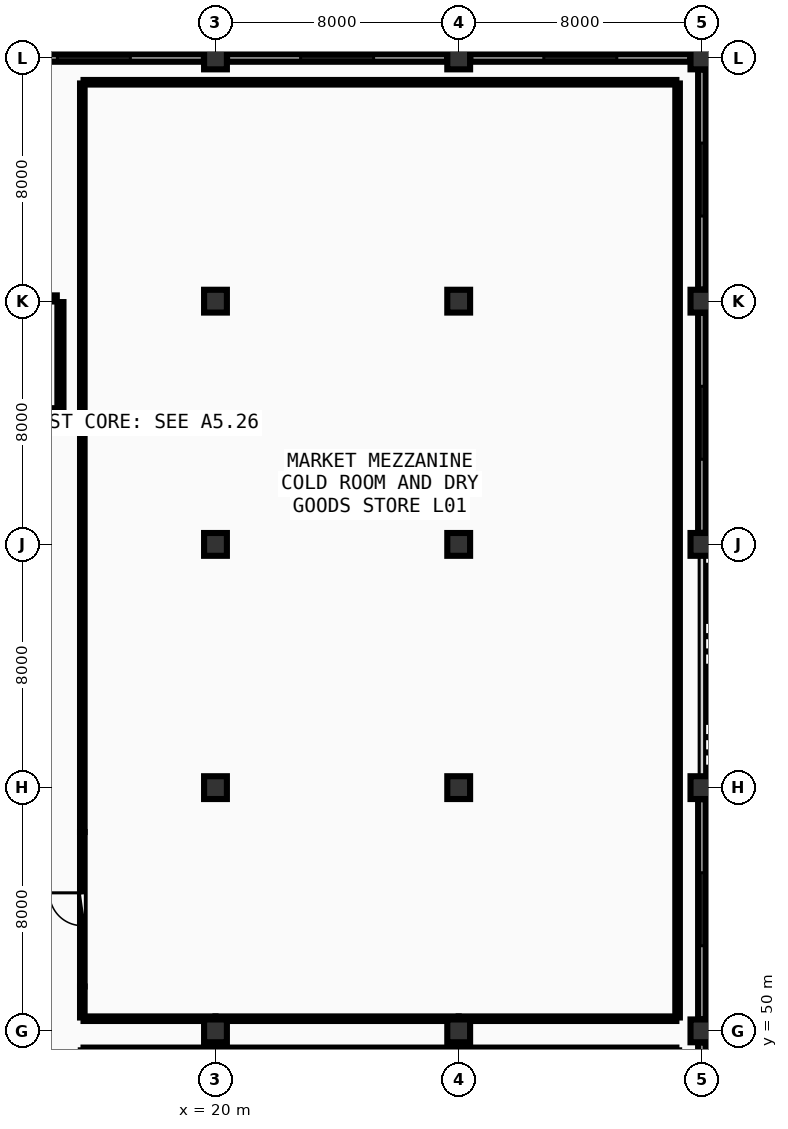
"""IFC4 building model, lengths in metres.
Left out: names, types, materials, properties, quantities, classifications, styles, units other than length and angle.
Written with IfcOpenShell. Run it as: python <this file> out.ifc"""

import sys

from ifc_helpers import new_model, si_unit, direction, frame, frame_2d, origin, origin_2d, place, context, subcontext, project, spatial, rectangle, extrude, element, fill, save


model = new_model("IFC4")
c1 = context("Model", 3, precision=1e-05, world=origin(), true_north=direction((0.0, 1.0)))
c2 = subcontext(c1, "Body", "Model", "MODEL_VIEW")
j1 = project(units=[si_unit("LENGTHUNIT", "METRE"), si_unit("PLANEANGLEUNIT", "RADIAN")], contexts=[c1])
p1 = place(None, origin())
s1 = spatial("IfcSite", under=j1, at=p1, CompositionType="ELEMENT")
p2 = place(p1, origin())
s2 = spatial("IfcBuilding", under=s1, at=p2, CompositionType="ELEMENT")
p3 = place(p2, frame((0.0, 0.0, 4.5)))
s3 = spatial("IfcBuildingStorey", under=s2, at=p3, CompositionType="ELEMENT", Elevation=4.5)
for number, where, z_axis, x_axis in (
    (1, (20.0, 50.0, 0.0), (0.0, 0.0, 1.0), (1.0, 0.0, 0.0)),
    (2, (20.0, 58.0, 0.0), (0.0, 0.0, 1.0), (1.0, 0.0, 0.0)),
    (3, (20.0, 66.0, 0.0), (0.0, 0.0, 1.0), (1.0, 0.0, 0.0)),
    (4, (20.0, 74.0, 0.0), (0.0, 0.0, 1.0), (1.0, 0.0, 0.0)),
    (5, (20.0, 82.0, 0.0), (0.0, 0.0, 1.0), (1.0, 0.0, 0.0)),
    (6, (28.0, 50.0, 0.0), (0.0, 0.0, 1.0), (1.0, 0.0, 0.0)),
    (7, (28.0, 58.0, 0.0), (0.0, 0.0, 1.0), (1.0, 0.0, 0.0)),
    (8, (28.0, 66.0, 0.0), (0.0, 0.0, 1.0), (1.0, 0.0, 0.0)),
    (9, (28.0, 74.0, 0.0), (0.0, 0.0, 1.0), (1.0, 0.0, 0.0)),
    (10, (28.0, 82.0, 0.0), (0.0, 0.0, 1.0), (1.0, 0.0, 0.0)),
    (11, (36.0, 50.0, 0.0), (0.0, 0.0, 1.0), (1.0, 0.0, 0.0)),
    (12, (36.0, 58.0, 0.0), (0.0, 0.0, 1.0), (1.0, 0.0, 0.0)),
    (13, (36.0, 66.0, 0.0), (0.0, 0.0, 1.0), (1.0, 0.0, 0.0)),
    (14, (36.0, 74.0, 0.0), (0.0, 0.0, 1.0), (1.0, 0.0, 0.0)),
    (15, (36.0, 82.0, 0.0), (0.0, 0.0, 1.0), (1.0, 0.0, 0.0)),
):
    element("IfcColumn", number, at=place(p3, frame(where, z_axis=z_axis, x_axis=x_axis)), inside=s3, PredefinedType="COLUMN", context=c2, shape_type="SweptSolid", body=[
        extrude(rectangle(XDim=0.75, YDim=0.75, at=origin_2d()), origin(), (0.0, 0.0, 1.0), 4.5),
    ])
p4 = place(p3, frame((36.0, 42.38, 0.0), z_axis=(0.0, 0.0, 1.0), x_axis=(0.0, 1.0, 0.0)))
e16 = element("IfcWall", 16, at=p4, inside=s3, PredefinedType="SOLIDWALL", context=c2, shape_type="SweptSolid", body=[
    extrude(rectangle(XDim=7.24, YDim=0.25, at=frame_2d((3.62, 0.0))), origin(), (0.0, 0.0, 1.0), 3.42),
])
p5 = place(p4, frame((2.42, 0.0, 0.95)))
e17 = element("IfcOpeningElement", 17, at=p5, cuts=e16, PredefinedType="OPENING", context=c2, shape_type="SweptSolid", body=[
    extrude(rectangle(XDim=2.4, YDim=1.65, at=frame_2d((1.2, 0.825))), frame((0.0, 0.135, 0.0), z_axis=(0.0, -1.0, 0.0), x_axis=(1.0, 0.0, 0.0)), (0.0, 0.0, 1.0), 0.27),
])
p6 = place(p3, frame((36.0, 50.38, 0.0), z_axis=(0.0, 0.0, 1.0), x_axis=(0.0, 1.0, 0.0)))
e18 = element("IfcWall", 18, at=p6, inside=s3, PredefinedType="SOLIDWALL", context=c2, shape_type="SweptSolid", body=[
    extrude(rectangle(XDim=7.24, YDim=0.25, at=frame_2d((3.62, 0.0))), origin(), (0.0, 0.0, 1.0), 3.42),
])
p7 = place(p6, frame((2.42, 0.0, 0.95)))
e19 = element("IfcOpeningElement", 19, at=p7, cuts=e18, PredefinedType="OPENING", context=c2, shape_type="SweptSolid", body=[
    extrude(rectangle(XDim=2.4, YDim=1.65, at=frame_2d((1.2, 0.825))), frame((0.0, 0.135, 0.0), z_axis=(0.0, -1.0, 0.0), x_axis=(1.0, 0.0, 0.0)), (0.0, 0.0, 1.0), 0.27),
])
p8 = place(p3, frame((36.0, 66.38, 0.0), z_axis=(0.0, 0.0, 1.0), x_axis=(0.0, 1.0, 0.0)))
e20 = element("IfcWall", 20, at=p8, inside=s3, PredefinedType="SOLIDWALL", context=c2, shape_type="SweptSolid", body=[
    extrude(rectangle(XDim=7.24, YDim=0.25, at=frame_2d((3.62, 0.0))), origin(), (0.0, 0.0, 1.0), 3.42),
])
p9 = place(p8, frame((2.42, 0.0, 0.95)))
e21 = element("IfcOpeningElement", 21, at=p9, cuts=e20, PredefinedType="OPENING", context=c2, shape_type="SweptSolid", body=[
    extrude(rectangle(XDim=2.4, YDim=1.65, at=frame_2d((1.2, 0.825))), frame((0.0, 0.135, 0.0), z_axis=(0.0, -1.0, 0.0), x_axis=(1.0, 0.0, 0.0)), (0.0, 0.0, 1.0), 0.27),
])
p10 = place(p3, frame((36.0, 74.38, 0.0), z_axis=(0.0, 0.0, 1.0), x_axis=(0.0, 1.0, 0.0)))
e22 = element("IfcWall", 22, at=p10, inside=s3, PredefinedType="SOLIDWALL", context=c2, shape_type="SweptSolid", body=[
    extrude(rectangle(XDim=7.24, YDim=0.25, at=frame_2d((3.62, 0.0))), origin(), (0.0, 0.0, 1.0), 3.42),
])
p11 = place(p10, frame((2.42, 0.0, 0.95)))
e23 = element("IfcOpeningElement", 23, at=p11, cuts=e22, PredefinedType="OPENING", context=c2, shape_type="SweptSolid", body=[
    extrude(rectangle(XDim=2.4, YDim=1.65, at=frame_2d((1.2, 0.825))), frame((0.0, 0.135, 0.0), z_axis=(0.0, -1.0, 0.0), x_axis=(1.0, 0.0, 0.0)), (0.0, 0.0, 1.0), 0.27),
])
p12 = place(p3, frame((35.62, 82.0, 0.0), z_axis=(0.0, 0.0, 1.0), x_axis=(-1.0, 0.0, 0.0)))
e24 = element("IfcWall", 24, at=p12, inside=s3, PredefinedType="SOLIDWALL", context=c2, shape_type="SweptSolid", body=[
    extrude(rectangle(XDim=7.24, YDim=0.25, at=frame_2d((3.62, 0.0))), origin(), (0.0, 0.0, 1.0), 3.42),
])
p13 = place(p12, frame((2.42, 0.0, 0.95)))
e25 = element("IfcOpeningElement", 25, at=p13, cuts=e24, PredefinedType="OPENING", context=c2, shape_type="SweptSolid", body=[
    extrude(rectangle(XDim=2.4, YDim=1.65, at=frame_2d((1.2, 0.825))), frame((0.0, 0.135, 0.0), z_axis=(0.0, -1.0, 0.0), x_axis=(1.0, 0.0, 0.0)), (0.0, 0.0, 1.0), 0.27),
])
p14 = place(p3, frame((27.62, 82.0, 0.0), z_axis=(0.0, 0.0, 1.0), x_axis=(-1.0, 0.0, 0.0)))
e26 = element("IfcWall", 26, at=p14, inside=s3, PredefinedType="SOLIDWALL", context=c2, shape_type="SweptSolid", body=[
    extrude(rectangle(XDim=7.24, YDim=0.25, at=frame_2d((3.62, 0.0))), origin(), (0.0, 0.0, 1.0), 3.42),
])
p15 = place(p14, frame((2.42, 0.0, 0.95)))
e27 = element("IfcOpeningElement", 27, at=p15, cuts=e26, PredefinedType="OPENING", context=c2, shape_type="SweptSolid", body=[
    extrude(rectangle(XDim=2.4, YDim=1.65, at=frame_2d((1.2, 0.825))), frame((0.0, 0.135, 0.0), z_axis=(0.0, -1.0, 0.0), x_axis=(1.0, 0.0, 0.0)), (0.0, 0.0, 1.0), 0.27),
])
p16 = place(p3, frame((19.62, 82.0, 0.0), z_axis=(0.0, 0.0, 1.0), x_axis=(-1.0, 0.0, 0.0)))
e28 = element("IfcWall", 28, at=p16, inside=s3, PredefinedType="SOLIDWALL", context=c2, shape_type="SweptSolid", body=[
    extrude(rectangle(XDim=7.24, YDim=0.25, at=frame_2d((3.62, 0.0))), origin(), (0.0, 0.0, 1.0), 3.42),
])
p17 = place(p16, frame((2.42, 0.0, 0.95)))
e29 = element("IfcOpeningElement", 29, at=p17, cuts=e28, PredefinedType="OPENING", context=c2, shape_type="SweptSolid", body=[
    extrude(rectangle(XDim=2.4, YDim=1.65, at=frame_2d((1.2, 0.825))), frame((0.0, 0.135, 0.0), z_axis=(0.0, -1.0, 0.0), x_axis=(1.0, 0.0, 0.0)), (0.0, 0.0, 1.0), 0.27),
])
p18 = place(p3, frame((7.02, 70.38, 0.0), z_axis=(0.0, 0.0, 1.0), x_axis=(1.0, 0.0, 0.0)))
e30 = element("IfcWall", 30, at=p18, inside=s3, PredefinedType="SHEAR", context=c2, shape_type="SweptSolid", body=[
    extrude(rectangle(XDim=7.76, YDim=0.2, at=frame_2d((3.88, 0.0))), origin(), (0.0, 0.0, 1.0), 4.24),
])
p19 = place(p18, frame((0.2, 0.0, 0.0)))
e31 = element("IfcOpeningElement", 31, at=p19, cuts=e30, PredefinedType="OPENING", context=c2, shape_type="SweptSolid", body=[
    extrude(rectangle(XDim=1.05, YDim=2.1, at=frame_2d((0.525, 1.05))), frame((0.0, 0.11, 0.0), z_axis=(0.0, -1.0, 0.0), x_axis=(1.0, 0.0, 0.0)), (0.0, 0.0, 1.0), 0.22),
])
p20 = place(p3, frame((14.9, 70.5, 0.0), z_axis=(0.0, 0.0, 1.0), x_axis=(0.0, 1.0, 0.0)))
e32 = element("IfcWall", 32, at=p20, inside=s3, PredefinedType="SHEAR", context=c2, shape_type="SweptSolid", body=[
    extrude(rectangle(XDim=3.47, YDim=0.2, at=frame_2d((1.735, 0.0))), origin(), (0.0, 0.0, 1.0), 4.24),
])
p21 = place(p3, frame((14.78, 74.09, 0.0), z_axis=(0.0, 0.0, 1.0), x_axis=(-1.0, 0.0, 0.0)))
e33 = element("IfcWall", 33, at=p21, inside=s3, PredefinedType="SHEAR", context=c2, shape_type="SweptSolid", body=[
    extrude(rectangle(XDim=7.76, YDim=0.2, at=frame_2d((3.88, 0.0))), origin(), (0.0, 0.0, 1.0), 4.24),
])
p22 = place(p3, frame((15.62, 51.46, 0.0), z_axis=(0.0, 0.0, 1.0), x_axis=(0.0, 1.0, 0.0)))
e34 = element("IfcWall", 34, at=p22, inside=s3, PredefinedType="PARTITIONING", context=c2, shape_type="SweptSolid", body=[
    extrude(rectangle(XDim=5.08, YDim=0.15, at=frame_2d((2.54, 0.0))), origin(), (0.0, 0.0, 1.0), 4.19),
])
p23 = place(p22, frame((2.0, 0.0, 0.0)))
e35 = element("IfcOpeningElement", 35, at=p23, cuts=e34, PredefinedType="OPENING", context=c2, shape_type="SweptSolid", body=[
    extrude(rectangle(XDim=1.08, YDim=2.1, at=frame_2d((0.54, 1.05))), frame((0.0, 0.085, 0.0), z_axis=(0.0, -1.0, 0.0), x_axis=(1.0, 0.0, 0.0)), (0.0, 0.0, 1.0), 0.17),
])
p24 = place(p3, frame((35.16, 49.4, 0.0), z_axis=(0.0, 0.0, 1.0), x_axis=(-1.0, 0.0, 0.0)))
e36 = element("IfcWall", 36, at=p24, inside=s3, PredefinedType="PARTITIONING", context=c2, shape_type="SweptSolid", body=[
    extrude(rectangle(XDim=19.5, YDim=0.1, at=frame_2d((9.75, 0.0))), origin(), (0.0, 0.0, 1.0), 3.425),
])
p25 = place(p3, frame((15.66, 50.4, 0.0), z_axis=(0.0, 0.0, 1.0), x_axis=(1.0, 0.0, 0.0)))
e37 = element("IfcWall", 37, at=p25, inside=s3, PredefinedType="PARTITIONING", context=c2, shape_type="SweptSolid", body=[
    extrude(rectangle(XDim=4.34, YDim=0.15, at=frame_2d((2.17, 0.0))), origin(), (0.0, 0.0, 1.0), 3.425),
])
p26 = place(p3, frame((20.0, 50.4, 0.0), z_axis=(0.0, 0.0, 1.0), x_axis=(1.0, 0.0, 0.0)))
e38 = element("IfcWall", 38, at=p26, inside=s3, PredefinedType="PARTITIONING", context=c2, shape_type="SweptSolid", body=[
    extrude(rectangle(XDim=8.0, YDim=0.15, at=frame_2d((4.0, 0.0))), origin(), (0.0, 0.0, 1.0), 3.425),
])
p27 = place(p3, frame((28.0, 50.4, 0.0), z_axis=(0.0, 0.0, 1.0), x_axis=(1.0, 0.0, 0.0)))
e39 = element("IfcWall", 39, at=p27, inside=s3, PredefinedType="PARTITIONING", context=c2, shape_type="SweptSolid", body=[
    extrude(rectangle(XDim=7.16, YDim=0.15, at=frame_2d((3.58, 0.0))), origin(), (0.0, 0.0, 1.0), 3.425),
])
p28 = place(p3, frame((35.2, 50.44, 0.0), z_axis=(0.0, 0.0, 1.0), x_axis=(0.0, 1.0, 0.0)))
e40 = element("IfcWall", 40, at=p28, inside=s3, PredefinedType="PARTITIONING", context=c2, shape_type="SweptSolid", body=[
    extrude(rectangle(XDim=30.72, YDim=0.15, at=frame_2d((15.36, 0.0))), origin(), (0.0, 0.0, 1.0), 3.425),
])
p29 = place(p3, frame((35.16, 81.2, 0.0), z_axis=(0.0, 0.0, 1.0), x_axis=(-1.0, 0.0, 0.0)))
e41 = element("IfcWall", 41, at=p29, inside=s3, PredefinedType="PARTITIONING", context=c2, shape_type="SweptSolid", body=[
    extrude(rectangle(XDim=19.5, YDim=0.15, at=frame_2d((9.75, 0.0))), origin(), (0.0, 0.0, 1.0), 3.425),
])
p30 = place(p3, frame((15.62, 81.16, 0.0), z_axis=(0.0, 0.0, 1.0), x_axis=(0.0, -1.0, 0.0)))
e42 = element("IfcWall", 42, at=p30, inside=s3, PredefinedType="PARTITIONING", context=c2, shape_type="SweptSolid", body=[
    extrude(rectangle(XDim=24.62, YDim=0.15, at=frame_2d((12.31, 0.0))), origin(), (0.0, 0.0, 1.0), 3.425),
])
p31 = place(p3, frame((15.62, 51.46, 0.0), z_axis=(0.0, 0.0, 1.0), x_axis=(0.0, -1.0, 0.0)))
e43 = element("IfcWall", 43, at=p31, inside=s3, PredefinedType="PARTITIONING", context=c2, shape_type="SweptSolid", body=[
    extrude(rectangle(XDim=1.02, YDim=0.15, at=frame_2d((0.51, 0.0))), origin(), (0.0, 0.0, 1.0), 4.19),
])
p32 = place(p7, origin())
e44 = element("IfcWindow", 44, at=p32, inside=s3, PartitioningType="SINGLE_PANEL", PredefinedType="WINDOW", context=c2, shape_type="SweptSolid", body=[
    extrude(rectangle(XDim=2.4, YDim=1.65, at=frame_2d((1.2, 0.825))), frame((0.0, 0.03, 0.0), z_axis=(0.0, -1.0, 0.0), x_axis=(1.0, 0.0, 0.0)), (0.0, 0.0, 1.0), 0.06),
])
fill(e19, e44)
p33 = place(p9, origin())
e45 = element("IfcWindow", 45, at=p33, inside=s3, PartitioningType="SINGLE_PANEL", PredefinedType="WINDOW", context=c2, shape_type="SweptSolid", body=[
    extrude(rectangle(XDim=2.4, YDim=1.65, at=frame_2d((1.2, 0.825))), frame((0.0, 0.03, 0.0), z_axis=(0.0, -1.0, 0.0), x_axis=(1.0, 0.0, 0.0)), (0.0, 0.0, 1.0), 0.06),
])
fill(e21, e45)
p34 = place(p11, origin())
e46 = element("IfcWindow", 46, at=p34, inside=s3, PartitioningType="SINGLE_PANEL", PredefinedType="WINDOW", context=c2, shape_type="SweptSolid", body=[
    extrude(rectangle(XDim=2.4, YDim=1.65, at=frame_2d((1.2, 0.825))), frame((0.0, 0.03, 0.0), z_axis=(0.0, -1.0, 0.0), x_axis=(1.0, 0.0, 0.0)), (0.0, 0.0, 1.0), 0.06),
])
fill(e23, e46)
p35 = place(p13, origin())
e47 = element("IfcWindow", 47, at=p35, inside=s3, PartitioningType="SINGLE_PANEL", PredefinedType="WINDOW", context=c2, shape_type="SweptSolid", body=[
    extrude(rectangle(XDim=2.4, YDim=1.65, at=frame_2d((1.2, 0.825))), frame((0.0, 0.03, 0.0), z_axis=(0.0, -1.0, 0.0), x_axis=(1.0, 0.0, 0.0)), (0.0, 0.0, 1.0), 0.06),
])
fill(e25, e47)
p36 = place(p15, origin())
e48 = element("IfcWindow", 48, at=p36, inside=s3, PartitioningType="SINGLE_PANEL", PredefinedType="WINDOW", context=c2, shape_type="SweptSolid", body=[
    extrude(rectangle(XDim=2.4, YDim=1.65, at=frame_2d((1.2, 0.825))), frame((0.0, 0.03, 0.0), z_axis=(0.0, -1.0, 0.0), x_axis=(1.0, 0.0, 0.0)), (0.0, 0.0, 1.0), 0.06),
])
fill(e27, e48)
p37 = place(p17, origin())
e49 = element("IfcWindow", 49, at=p37, inside=s3, PartitioningType="SINGLE_PANEL", PredefinedType="WINDOW", context=c2, shape_type="SweptSolid", body=[
    extrude(rectangle(XDim=2.4, YDim=1.65, at=frame_2d((1.2, 0.825))), frame((0.0, 0.03, 0.0), z_axis=(0.0, -1.0, 0.0), x_axis=(1.0, 0.0, 0.0)), (0.0, 0.0, 1.0), 0.06),
])
fill(e29, e49)
p38 = place(p23, origin())
e50 = element("IfcDoor", 50, at=p38, inside=s3, OperationType="SINGLE_SWING_RIGHT", PredefinedType="DOOR", context=c2, shape_type="SweptSolid", body=[
    extrude(rectangle(XDim=1.08, YDim=2.1, at=frame_2d((0.54, 1.05))), frame((0.0, 0.025, 0.0), z_axis=(0.0, -1.0, 0.0), x_axis=(1.0, 0.0, 0.0)), (0.0, 0.0, 1.0), 0.05),
])
fill(e35, e50)
save(model, sys.argv[1])
